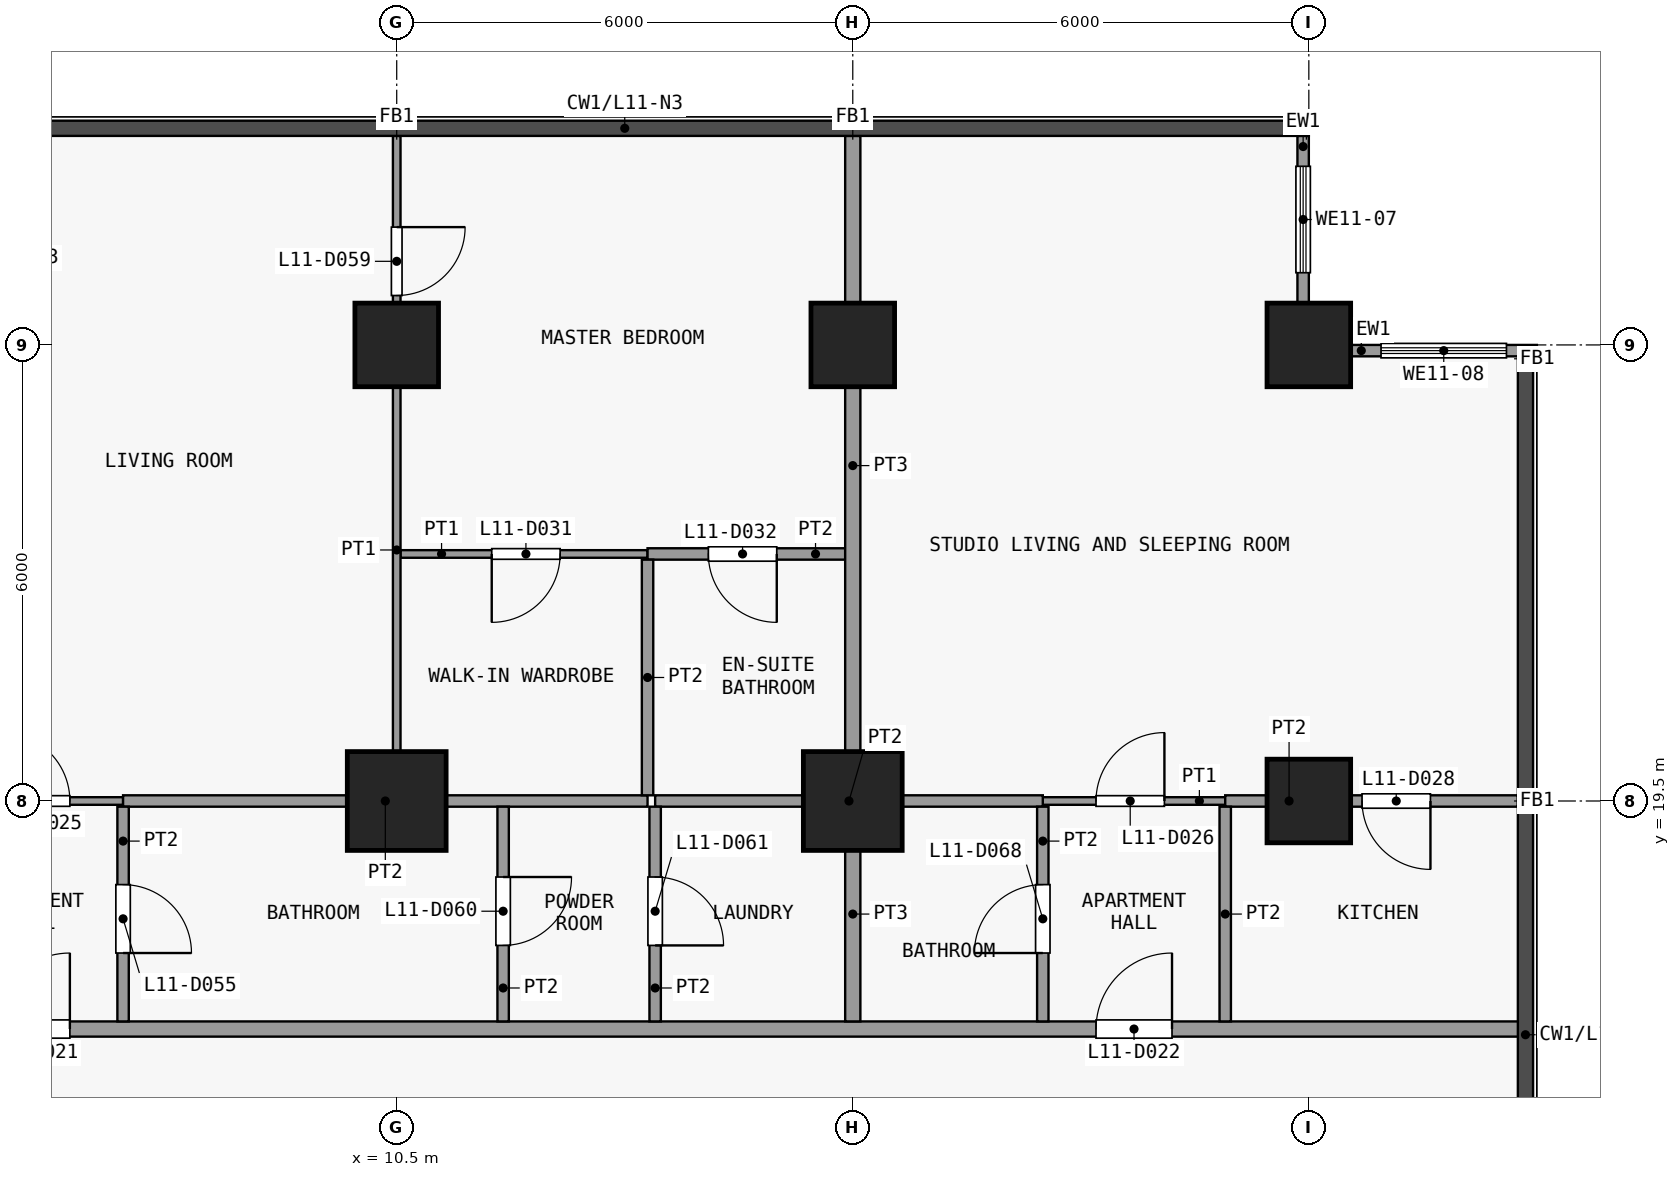
"""IFC4 building model, lengths in metres.
Left out: names, types, materials, properties, quantities, classifications, styles, units other than length and angle.
Written with IfcOpenShell. Run it as: python <this file> out.ifc"""

import sys

from ifc_helpers import new_model, si_unit, direction, frame, frame_2d, origin, origin_2d, place, context, subcontext, project, spatial, rectangle, extrude, element, fill, save


model = new_model("IFC4")
c1 = context("Model", 3, precision=1e-05, world=origin(), true_north=direction((0.0, 1.0)))
c2 = subcontext(c1, "Body", "Model", "MODEL_VIEW")
j1 = project(units=[si_unit("LENGTHUNIT", "METRE"), si_unit("PLANEANGLEUNIT", "RADIAN")], contexts=[c1])
p1 = place(None, origin())
s1 = spatial("IfcSite", under=j1, at=p1, CompositionType="ELEMENT")
p2 = place(p1, origin())
s2 = spatial("IfcBuilding", under=s1, at=p2, CompositionType="ELEMENT")
p3 = place(p2, frame((0.0, 0.0, 50.5)))
s3 = spatial("IfcBuildingStorey", under=s2, at=p3, CompositionType="ELEMENT", Elevation=50.5)
p4 = place(p3, frame((10.5, 19.5, 0.0), z_axis=(0.0, 0.0, 1.0), x_axis=(1.0, 0.0, 0.0)))
e1 = element("IfcColumn", 1, at=p4, inside=s3, PredefinedType="COLUMN", context=c2, shape_type="SweptSolid", body=[
    extrude(rectangle(XDim=1.3, YDim=1.3, at=origin_2d()), origin(), (0.0, 0.0, 1.0), 3.6),
])
p5 = place(p3, frame((10.5, 25.5, 0.0), z_axis=(0.0, 0.0, 1.0), x_axis=(1.0, 0.0, 0.0)))
e2 = element("IfcColumn", 2, at=p5, inside=s3, PredefinedType="COLUMN", context=c2, shape_type="SweptSolid", body=[
    extrude(rectangle(XDim=1.1, YDim=1.1, at=origin_2d()), origin(), (0.0, 0.0, 1.0), 3.6),
])
p6 = place(p3, frame((16.5, 19.5, 0.0), z_axis=(0.0, 0.0, 1.0), x_axis=(1.0, 0.0, 0.0)))
e3 = element("IfcColumn", 3, at=p6, inside=s3, PredefinedType="COLUMN", context=c2, shape_type="SweptSolid", body=[
    extrude(rectangle(XDim=1.3, YDim=1.3, at=origin_2d()), origin(), (0.0, 0.0, 1.0), 3.6),
])
for number, where, z_axis, x_axis in (
    (4, (16.5, 25.5, 0.0), (0.0, 0.0, 1.0), (1.0, 0.0, 0.0)),
    (5, (22.5, 19.5, 0.0), (0.0, 0.0, 1.0), (1.0, 0.0, 0.0)),
    (6, (22.5, 25.5, 0.0), (0.0, 0.0, 1.0), (1.0, 0.0, 0.0)),
):
    element("IfcColumn", number, at=place(p3, frame(where, z_axis=z_axis, x_axis=x_axis)), inside=s3, PredefinedType="COLUMN", context=c2, shape_type="SweptSolid", body=[
        extrude(rectangle(XDim=1.1, YDim=1.1, at=origin_2d()), origin(), (0.0, 0.0, 1.0), 3.6),
    ])
p7 = place(p3, frame((22.425, 28.25, 0.0), z_axis=(0.0, 0.0, 1.0), x_axis=(0.0, -1.0, 0.0)))
e7 = element("IfcWall", 7, at=p7, inside=s3, PredefinedType="SOLIDWALL", context=c2, shape_type="SweptSolid", body=[
    extrude(rectangle(XDim=2.2, YDim=0.15, at=frame_2d((1.1, 0.0))), origin(), (0.0, 0.0, 1.0), 3.3),
])
p8 = place(p7, frame((0.4, 0.0, 0.9)))
e8 = element("IfcOpeningElement", 8, at=p8, cuts=e7, PredefinedType="OPENING", context=c2, shape_type="SweptSolid", body=[
    extrude(rectangle(XDim=1.4, YDim=2.4, at=frame_2d((0.7, 1.2))), frame((0.0, 0.085, 0.0), z_axis=(0.0, -1.0, 0.0), x_axis=(1.0, 0.0, 0.0)), (0.0, 0.0, 1.0), 0.17),
])
p9 = place(p3, frame((23.05, 25.425, 0.0), z_axis=(0.0, 0.0, 1.0), x_axis=(1.0, 0.0, 0.0)))
e9 = element("IfcWall", 9, at=p9, inside=s3, PredefinedType="SOLIDWALL", context=c2, shape_type="SweptSolid", body=[
    extrude(rectangle(XDim=2.45, YDim=0.15, at=frame_2d((1.225, 0.0))), origin(), (0.0, 0.0, 1.0), 3.3),
])
p10 = place(p9, frame((0.4, 0.0, 0.9)))
e10 = element("IfcOpeningElement", 10, at=p10, cuts=e9, PredefinedType="OPENING", context=c2, shape_type="SweptSolid", body=[
    extrude(rectangle(XDim=1.65, YDim=2.4, at=frame_2d((0.825, 1.2))), frame((0.0, 0.085, 0.0), z_axis=(0.0, -1.0, 0.0), x_axis=(1.0, 0.0, 0.0)), (0.0, 0.0, 1.0), 0.17),
])
p11 = place(p3, frame((-25.35, 16.5, 0.0), z_axis=(0.0, 0.0, 1.0), x_axis=(1.0, 0.0, 0.0)))
e11 = element("IfcWall", 11, at=p11, inside=s3, PredefinedType="PARTITIONING", context=c2, shape_type="SweptSolid", body=[
    extrude(rectangle(XDim=50.7, YDim=0.2, at=frame_2d((25.35, 0.0))), origin(), (0.0, 0.0, 1.0), 3.3),
])
p12 = place(p11, frame((7.05, 0.0, 0.0)))
e12 = element("IfcOpeningElement", 12, at=p12, cuts=e11, PredefinedType="OPENING", context=c2, shape_type="SweptSolid", body=[
    extrude(rectangle(XDim=1.0, YDim=2.1, at=frame_2d((0.5, 1.05))), frame((0.0, 0.11, 0.0), z_axis=(0.0, -1.0, 0.0), x_axis=(1.0, 0.0, 0.0)), (0.0, 0.0, 1.0), 0.22),
])
p13 = place(p11, frame((15.55, 0.0, 0.0)))
e13 = element("IfcOpeningElement", 13, at=p13, cuts=e11, PredefinedType="OPENING", context=c2, shape_type="SweptSolid", body=[
    extrude(rectangle(XDim=1.0, YDim=2.1, at=frame_2d((0.5, 1.05))), frame((0.0, 0.11, 0.0), z_axis=(0.0, -1.0, 0.0), x_axis=(1.0, 0.0, 0.0)), (0.0, 0.0, 1.0), 0.22),
])
p14 = place(p11, frame((30.55, 0.0, 0.0)))
e14 = element("IfcOpeningElement", 14, at=p14, cuts=e11, PredefinedType="OPENING", context=c2, shape_type="SweptSolid", body=[
    extrude(rectangle(XDim=1.0, YDim=2.1, at=frame_2d((0.5, 1.05))), frame((0.0, 0.11, 0.0), z_axis=(0.0, -1.0, 0.0), x_axis=(1.0, 0.0, 0.0)), (0.0, 0.0, 1.0), 0.22),
])
p15 = place(p11, frame((45.05, 0.0, 0.0)))
e15 = element("IfcOpeningElement", 15, at=p15, cuts=e11, PredefinedType="OPENING", context=c2, shape_type="SweptSolid", body=[
    extrude(rectangle(XDim=1.0, YDim=2.1, at=frame_2d((0.5, 1.05))), frame((0.0, 0.11, 0.0), z_axis=(0.0, -1.0, 0.0), x_axis=(1.0, 0.0, 0.0)), (0.0, 0.0, 1.0), 0.22),
])
p16 = place(p3, frame((4.5, 19.5, 0.0), z_axis=(0.0, 0.0, 1.0), x_axis=(1.0, 0.0, 0.0)))
e16 = element("IfcWall", 16, at=p16, inside=s3, PredefinedType="PARTITIONING", context=c2, shape_type="SweptSolid", body=[
    extrude(rectangle(XDim=2.4, YDim=0.1, at=frame_2d((1.2, 0.0))), origin(), (0.0, 0.0, 1.0), 3.3),
])
p17 = place(p16, frame((0.8, 0.0, 0.0)))
e17 = element("IfcOpeningElement", 17, at=p17, cuts=e16, PredefinedType="OPENING", context=c2, shape_type="SweptSolid", body=[
    extrude(rectangle(XDim=0.9, YDim=2.1, at=frame_2d((0.45, 1.05))), frame((0.0, 0.06, 0.0), z_axis=(0.0, -1.0, 0.0), x_axis=(1.0, 0.0, 0.0)), (0.0, 0.0, 1.0), 0.12),
])
p18 = place(p3, frame((19.0, 19.5, 0.0), z_axis=(0.0, 0.0, 1.0), x_axis=(1.0, 0.0, 0.0)))
e18 = element("IfcWall", 18, at=p18, inside=s3, PredefinedType="PARTITIONING", context=c2, shape_type="SweptSolid", body=[
    extrude(rectangle(XDim=2.4, YDim=0.1, at=frame_2d((1.2, 0.0))), origin(), (0.0, 0.0, 1.0), 3.3),
])
p19 = place(p18, frame((0.7, 0.0, 0.0)))
e19 = element("IfcOpeningElement", 19, at=p19, cuts=e18, PredefinedType="OPENING", context=c2, shape_type="SweptSolid", body=[
    extrude(rectangle(XDim=0.9, YDim=2.1, at=frame_2d((0.45, 1.05))), frame((0.0, 0.06, 0.0), z_axis=(0.0, -1.0, 0.0), x_axis=(1.0, 0.0, 0.0)), (0.0, 0.0, 1.0), 0.12),
])
p20 = place(p3, frame((6.9, 19.5, 0.0), z_axis=(0.0, 0.0, 1.0), x_axis=(1.0, 0.0, 0.0)))
e20 = element("IfcWall", 20, at=p20, inside=s3, PredefinedType="PARTITIONING", context=c2, shape_type="SweptSolid", body=[
    extrude(rectangle(XDim=6.9, YDim=0.15, at=frame_2d((3.45, 0.0))), origin(), (0.0, 0.0, 1.0), 3.3),
])
p21 = place(p3, frame((13.9, 19.5, 0.0), z_axis=(0.0, 0.0, 1.0), x_axis=(1.0, 0.0, 0.0)))
e21 = element("IfcWall", 21, at=p21, inside=s3, PredefinedType="PARTITIONING", context=c2, shape_type="SweptSolid", body=[
    extrude(rectangle(XDim=5.1, YDim=0.15, at=frame_2d((2.55, 0.0))), origin(), (0.0, 0.0, 1.0), 3.3),
])
p22 = place(p3, frame((21.4, 19.5, 0.0), z_axis=(0.0, 0.0, 1.0), x_axis=(1.0, 0.0, 0.0)))
e22 = element("IfcWall", 22, at=p22, inside=s3, PredefinedType="PARTITIONING", context=c2, shape_type="SweptSolid", body=[
    extrude(rectangle(XDim=3.85, YDim=0.15, at=frame_2d((1.925, 0.0))), origin(), (0.0, 0.0, 1.0), 3.3),
])
p23 = place(p22, frame((1.8, 0.0, 0.0)))
e23 = element("IfcOpeningElement", 23, at=p23, cuts=e22, PredefinedType="OPENING", context=c2, shape_type="SweptSolid", body=[
    extrude(rectangle(XDim=0.9, YDim=2.1, at=frame_2d((0.45, 1.05))), frame((0.0, 0.085, 0.0), z_axis=(0.0, -1.0, 0.0), x_axis=(1.0, 0.0, 0.0)), (0.0, 0.0, 1.0), 0.17),
])
p24 = place(p3, frame((10.55, 22.75, 0.0), z_axis=(0.0, 0.0, 1.0), x_axis=(1.0, 0.0, 0.0)))
e24 = element("IfcWall", 24, at=p24, inside=s3, PredefinedType="PARTITIONING", context=c2, shape_type="SweptSolid", body=[
    extrude(rectangle(XDim=3.25, YDim=0.1, at=frame_2d((1.625, 0.0))), origin(), (0.0, 0.0, 1.0), 3.3),
])
p25 = place(p24, frame((1.2, 0.0, 0.0)))
e25 = element("IfcOpeningElement", 25, at=p25, cuts=e24, PredefinedType="OPENING", context=c2, shape_type="SweptSolid", body=[
    extrude(rectangle(XDim=0.9, YDim=2.1, at=frame_2d((0.45, 1.05))), frame((0.0, 0.06, 0.0), z_axis=(0.0, -1.0, 0.0), x_axis=(1.0, 0.0, 0.0)), (0.0, 0.0, 1.0), 0.12),
])
p26 = place(p3, frame((13.8, 22.75, 0.0), z_axis=(0.0, 0.0, 1.0), x_axis=(1.0, 0.0, 0.0)))
e26 = element("IfcWall", 26, at=p26, inside=s3, PredefinedType="PARTITIONING", context=c2, shape_type="SweptSolid", body=[
    extrude(rectangle(XDim=2.6, YDim=0.15, at=frame_2d((1.3, 0.0))), origin(), (0.0, 0.0, 1.0), 3.3),
])
p27 = place(p26, frame((0.8, 0.0, 0.0)))
e27 = element("IfcOpeningElement", 27, at=p27, cuts=e26, PredefinedType="OPENING", context=c2, shape_type="SweptSolid", body=[
    extrude(rectangle(XDim=0.9, YDim=2.1, at=frame_2d((0.45, 1.05))), frame((0.0, 0.085, 0.0), z_axis=(0.0, -1.0, 0.0), x_axis=(1.0, 0.0, 0.0)), (0.0, 0.0, 1.0), 0.17),
])
p28 = place(p3, frame((6.9, 16.6, 0.0), z_axis=(0.0, 0.0, 1.0), x_axis=(0.0, 1.0, 0.0)))
e28 = element("IfcWall", 28, at=p28, inside=s3, PredefinedType="PARTITIONING", context=c2, shape_type="SweptSolid", body=[
    extrude(rectangle(XDim=2.825, YDim=0.15, at=frame_2d((1.413, 0.0))), origin(), (0.0, 0.0, 1.0), 3.3),
])
p29 = place(p28, frame((0.9, 0.0, 0.0)))
e29 = element("IfcOpeningElement", 29, at=p29, cuts=e28, PredefinedType="OPENING", context=c2, shape_type="SweptSolid", body=[
    extrude(rectangle(XDim=0.9, YDim=2.1, at=frame_2d((0.45, 1.05))), frame((0.0, 0.085, 0.0), z_axis=(0.0, -1.0, 0.0), x_axis=(1.0, 0.0, 0.0)), (0.0, 0.0, 1.0), 0.17),
])
p30 = place(p3, frame((10.5, 19.575, 0.0), z_axis=(0.0, 0.0, 1.0), x_axis=(0.0, 1.0, 0.0)))
e30 = element("IfcWall", 30, at=p30, inside=s3, PredefinedType="PARTITIONING", context=c2, shape_type="SweptSolid", body=[
    extrude(rectangle(XDim=8.675, YDim=0.1, at=frame_2d((4.337, 0.0))), origin(), (0.0, 0.0, 1.0), 3.3),
])
p31 = place(p30, frame((6.575, 0.0, 0.0)))
e31 = element("IfcOpeningElement", 31, at=p31, cuts=e30, PredefinedType="OPENING", context=c2, shape_type="SweptSolid", body=[
    extrude(rectangle(XDim=0.9, YDim=2.1, at=frame_2d((0.45, 1.05))), frame((0.0, 0.06, 0.0), z_axis=(0.0, -1.0, 0.0), x_axis=(1.0, 0.0, 0.0)), (0.0, 0.0, 1.0), 0.12),
])
p32 = place(p3, frame((11.9, 16.6, 0.0), z_axis=(0.0, 0.0, 1.0), x_axis=(0.0, 1.0, 0.0)))
e32 = element("IfcWall", 32, at=p32, inside=s3, PredefinedType="PARTITIONING", context=c2, shape_type="SweptSolid", body=[
    extrude(rectangle(XDim=2.825, YDim=0.15, at=frame_2d((1.413, 0.0))), origin(), (0.0, 0.0, 1.0), 3.3),
])
p33 = place(p32, frame((1.0, 0.0, 0.0)))
e33 = element("IfcOpeningElement", 33, at=p33, cuts=e32, PredefinedType="OPENING", context=c2, shape_type="SweptSolid", body=[
    extrude(rectangle(XDim=0.9, YDim=2.1, at=frame_2d((0.45, 1.05))), frame((0.0, 0.085, 0.0), z_axis=(0.0, -1.0, 0.0), x_axis=(1.0, 0.0, 0.0)), (0.0, 0.0, 1.0), 0.17),
])
p34 = place(p3, frame((13.8, 19.575, 0.0), z_axis=(0.0, 0.0, 1.0), x_axis=(0.0, 1.0, 0.0)))
e34 = element("IfcWall", 34, at=p34, inside=s3, PredefinedType="PARTITIONING", context=c2, shape_type="SweptSolid", body=[
    extrude(rectangle(XDim=3.1, YDim=0.15, at=frame_2d((1.55, 0.0))), origin(), (0.0, 0.0, 1.0), 3.3),
])
p35 = place(p3, frame((13.9, 16.6, 0.0), z_axis=(0.0, 0.0, 1.0), x_axis=(0.0, 1.0, 0.0)))
e35 = element("IfcWall", 35, at=p35, inside=s3, PredefinedType="PARTITIONING", context=c2, shape_type="SweptSolid", body=[
    extrude(rectangle(XDim=2.825, YDim=0.15, at=frame_2d((1.413, 0.0))), origin(), (0.0, 0.0, 1.0), 3.3),
])
p36 = place(p35, frame((1.0, 0.0, 0.0)))
e36 = element("IfcOpeningElement", 36, at=p36, cuts=e35, PredefinedType="OPENING", context=c2, shape_type="SweptSolid", body=[
    extrude(rectangle(XDim=0.9, YDim=2.1, at=frame_2d((0.45, 1.05))), frame((0.0, 0.085, 0.0), z_axis=(0.0, -1.0, 0.0), x_axis=(1.0, 0.0, 0.0)), (0.0, 0.0, 1.0), 0.17),
])
p37 = place(p3, frame((16.5, 16.6, 0.0), z_axis=(0.0, 0.0, 1.0), x_axis=(0.0, 1.0, 0.0)))
e37 = element("IfcWall", 37, at=p37, inside=s3, PredefinedType="PARTITIONING", context=c2, shape_type="SweptSolid", body=[
    extrude(rectangle(XDim=2.825, YDim=0.2, at=frame_2d((1.413, 0.0))), origin(), (0.0, 0.0, 1.0), 3.3),
])
p38 = place(p3, frame((16.5, 19.575, 0.0), z_axis=(0.0, 0.0, 1.0), x_axis=(0.0, 1.0, 0.0)))
e38 = element("IfcWall", 38, at=p38, inside=s3, PredefinedType="PARTITIONING", context=c2, shape_type="SweptSolid", body=[
    extrude(rectangle(XDim=8.675, YDim=0.2, at=frame_2d((4.337, 0.0))), origin(), (0.0, 0.0, 1.0), 3.3),
])
p39 = place(p3, frame((19.0, 16.6, 0.0), z_axis=(0.0, 0.0, 1.0), x_axis=(0.0, 1.0, 0.0)))
e39 = element("IfcWall", 39, at=p39, inside=s3, PredefinedType="PARTITIONING", context=c2, shape_type="SweptSolid", body=[
    extrude(rectangle(XDim=2.825, YDim=0.15, at=frame_2d((1.413, 0.0))), origin(), (0.0, 0.0, 1.0), 3.3),
])
p40 = place(p39, frame((0.9, 0.0, 0.0)))
e40 = element("IfcOpeningElement", 40, at=p40, cuts=e39, PredefinedType="OPENING", context=c2, shape_type="SweptSolid", body=[
    extrude(rectangle(XDim=0.9, YDim=2.1, at=frame_2d((0.45, 1.05))), frame((0.0, 0.085, 0.0), z_axis=(0.0, -1.0, 0.0), x_axis=(1.0, 0.0, 0.0)), (0.0, 0.0, 1.0), 0.17),
])
p41 = place(p3, frame((21.4, 16.6, 0.0), z_axis=(0.0, 0.0, 1.0), x_axis=(0.0, 1.0, 0.0)))
e41 = element("IfcWall", 41, at=p41, inside=s3, PredefinedType="PARTITIONING", context=c2, shape_type="SweptSolid", body=[
    extrude(rectangle(XDim=2.825, YDim=0.15, at=frame_2d((1.413, 0.0))), origin(), (0.0, 0.0, 1.0), 3.3),
])
p42 = place(p8, origin())
e42 = element("IfcWindow", 42, at=p42, inside=s3, PartitioningType="SINGLE_PANEL", PredefinedType="WINDOW", context=c2, shape_type="SweptSolid", body=[
    extrude(rectangle(XDim=1.4, YDim=2.4, at=frame_2d((0.7, 1.2))), frame((0.0, 0.03, 0.0), z_axis=(0.0, -1.0, 0.0), x_axis=(1.0, 0.0, 0.0)), (0.0, 0.0, 1.0), 0.06),
])
fill(e8, e42)
p43 = place(p10, origin())
e43 = element("IfcWindow", 43, at=p43, inside=s3, PartitioningType="SINGLE_PANEL", PredefinedType="WINDOW", context=c2, shape_type="SweptSolid", body=[
    extrude(rectangle(XDim=1.65, YDim=2.4, at=frame_2d((0.825, 1.2))), frame((0.0, 0.03, 0.0), z_axis=(0.0, -1.0, 0.0), x_axis=(1.0, 0.0, 0.0)), (0.0, 0.0, 1.0), 0.06),
])
fill(e10, e43)
p44 = place(p14, origin())
e44 = element("IfcDoor", 44, at=p44, inside=s3, OperationType="SINGLE_SWING_LEFT", PredefinedType="DOOR", context=c2, shape_type="SweptSolid", body=[
    extrude(rectangle(XDim=1.0, YDim=2.1, at=frame_2d((0.5, 1.05))), frame((0.0, 0.025, 0.0), z_axis=(0.0, -1.0, 0.0), x_axis=(1.0, 0.0, 0.0)), (0.0, 0.0, 1.0), 0.05),
])
fill(e14, e44)
p45 = place(p15, origin())
e45 = element("IfcDoor", 45, at=p45, inside=s3, OperationType="SINGLE_SWING_LEFT", PredefinedType="DOOR", context=c2, shape_type="SweptSolid", body=[
    extrude(rectangle(XDim=1.0, YDim=2.1, at=frame_2d((0.5, 1.05))), frame((0.0, 0.025, 0.0), z_axis=(0.0, -1.0, 0.0), x_axis=(1.0, 0.0, 0.0)), (0.0, 0.0, 1.0), 0.05),
])
fill(e15, e45)
p46 = place(p17, origin())
e46 = element("IfcDoor", 46, at=p46, inside=s3, OperationType="SINGLE_SWING_RIGHT", PredefinedType="DOOR", context=c2, shape_type="SweptSolid", body=[
    extrude(rectangle(XDim=0.9, YDim=2.1, at=frame_2d((0.45, 1.05))), frame((0.0, 0.025, 0.0), z_axis=(0.0, -1.0, 0.0), x_axis=(1.0, 0.0, 0.0)), (0.0, 0.0, 1.0), 0.05),
])
fill(e17, e46)
p47 = place(p19, origin())
e47 = element("IfcDoor", 47, at=p47, inside=s3, OperationType="SINGLE_SWING_LEFT", PredefinedType="DOOR", context=c2, shape_type="SweptSolid", body=[
    extrude(rectangle(XDim=0.9, YDim=2.1, at=frame_2d((0.45, 1.05))), frame((0.0, 0.025, 0.0), z_axis=(0.0, -1.0, 0.0), x_axis=(1.0, 0.0, 0.0)), (0.0, 0.0, 1.0), 0.05),
])
fill(e19, e47)
p48 = place(p23, origin())
e48 = element("IfcDoor", 48, at=p48, inside=s3, OperationType="SINGLE_SWING_RIGHT", PredefinedType="DOOR", context=c2, shape_type="SweptSolid", body=[
    extrude(rectangle(XDim=0.9, YDim=2.1, at=frame_2d((0.45, 1.05))), frame((0.0, 0.025, 0.0), z_axis=(0.0, -1.0, 0.0), x_axis=(1.0, 0.0, 0.0)), (0.0, 0.0, 1.0), 0.05),
])
fill(e23, e48)
p49 = place(p25, origin())
e49 = element("IfcDoor", 49, at=p49, inside=s3, OperationType="SINGLE_SWING_LEFT", PredefinedType="DOOR", context=c2, shape_type="SweptSolid", body=[
    extrude(rectangle(XDim=0.9, YDim=2.1, at=frame_2d((0.45, 1.05))), frame((0.0, 0.025, 0.0), z_axis=(0.0, -1.0, 0.0), x_axis=(1.0, 0.0, 0.0)), (0.0, 0.0, 1.0), 0.05),
])
fill(e25, e49)
p50 = place(p27, origin())
e50 = element("IfcDoor", 50, at=p50, inside=s3, OperationType="SINGLE_SWING_RIGHT", PredefinedType="DOOR", context=c2, shape_type="SweptSolid", body=[
    extrude(rectangle(XDim=0.9, YDim=2.1, at=frame_2d((0.45, 1.05))), frame((0.0, 0.025, 0.0), z_axis=(0.0, -1.0, 0.0), x_axis=(1.0, 0.0, 0.0)), (0.0, 0.0, 1.0), 0.05),
])
fill(e27, e50)
p51 = place(p29, origin())
e51 = element("IfcDoor", 51, at=p51, inside=s3, OperationType="SINGLE_SWING_LEFT", PredefinedType="DOOR", context=c2, shape_type="SweptSolid", body=[
    extrude(rectangle(XDim=0.9, YDim=2.1, at=frame_2d((0.45, 1.05))), frame((0.0, 0.025, 0.0), z_axis=(0.0, -1.0, 0.0), x_axis=(1.0, 0.0, 0.0)), (0.0, 0.0, 1.0), 0.05),
])
fill(e29, e51)
p52 = place(p31, origin())
e52 = element("IfcDoor", 52, at=p52, inside=s3, OperationType="SINGLE_SWING_RIGHT", PredefinedType="DOOR", context=c2, shape_type="SweptSolid", body=[
    extrude(rectangle(XDim=0.9, YDim=2.1, at=frame_2d((0.45, 1.05))), frame((0.0, 0.025, 0.0), z_axis=(0.0, -1.0, 0.0), x_axis=(1.0, 0.0, 0.0)), (0.0, 0.0, 1.0), 0.05),
])
fill(e31, e52)
p53 = place(p33, origin())
e53 = element("IfcDoor", 53, at=p53, inside=s3, OperationType="SINGLE_SWING_RIGHT", PredefinedType="DOOR", context=c2, shape_type="SweptSolid", body=[
    extrude(rectangle(XDim=0.9, YDim=2.1, at=frame_2d((0.45, 1.05))), frame((0.0, 0.025, 0.0), z_axis=(0.0, -1.0, 0.0), x_axis=(1.0, 0.0, 0.0)), (0.0, 0.0, 1.0), 0.05),
])
fill(e33, e53)
p54 = place(p36, origin())
e54 = element("IfcDoor", 54, at=p54, inside=s3, OperationType="SINGLE_SWING_LEFT", PredefinedType="DOOR", context=c2, shape_type="SweptSolid", body=[
    extrude(rectangle(XDim=0.9, YDim=2.1, at=frame_2d((0.45, 1.05))), frame((0.0, 0.025, 0.0), z_axis=(0.0, -1.0, 0.0), x_axis=(1.0, 0.0, 0.0)), (0.0, 0.0, 1.0), 0.05),
])
fill(e36, e54)
p55 = place(p40, origin())
e55 = element("IfcDoor", 55, at=p55, inside=s3, OperationType="SINGLE_SWING_RIGHT", PredefinedType="DOOR", context=c2, shape_type="SweptSolid", body=[
    extrude(rectangle(XDim=0.9, YDim=2.1, at=frame_2d((0.45, 1.05))), frame((0.0, 0.025, 0.0), z_axis=(0.0, -1.0, 0.0), x_axis=(1.0, 0.0, 0.0)), (0.0, 0.0, 1.0), 0.05),
])
fill(e40, e55)
save(model, sys.argv[1])
